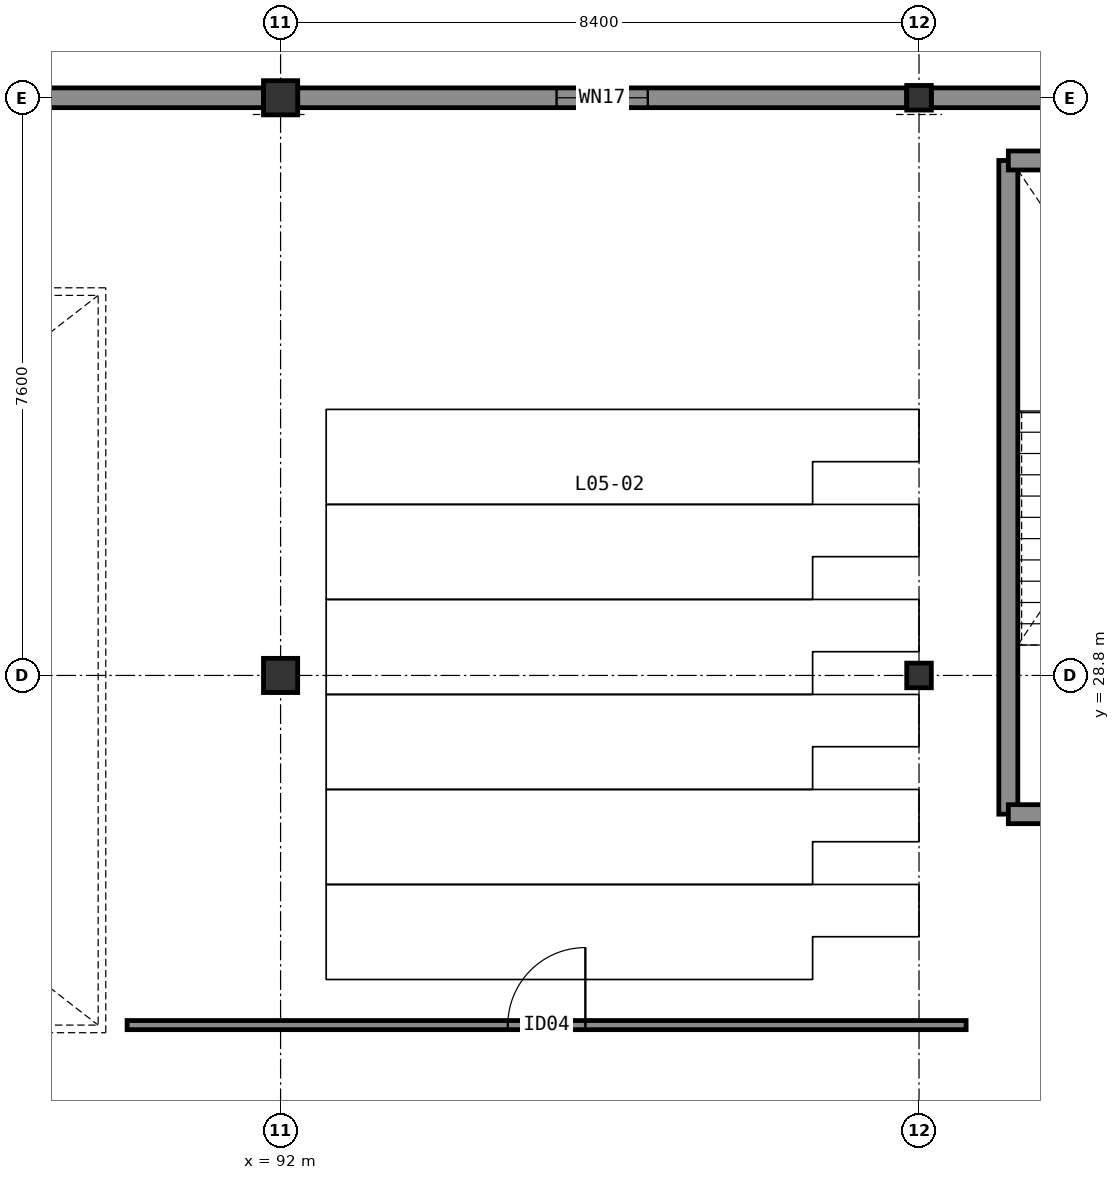
"""IFC4 building model, lengths in metres.
Left out: names, types, materials, properties, quantities, classifications, styles, units other than length and angle.
Written with IfcOpenShell. Run it as: python <this file> out.ifc"""

import sys

from ifc_helpers import new_model, si_unit, direction, frame, frame_2d, origin, origin_2d, place, context, subcontext, project, spatial, rectangle, hollow_circle, extrude, element, fill, save


model = new_model("IFC4")
c1 = context("Model", 3, precision=1e-05, world=origin(), true_north=direction((0.0, 1.0)))
c2 = subcontext(c1, "Body", "Model", "MODEL_VIEW")
j1 = project(units=[si_unit("LENGTHUNIT", "METRE"), si_unit("PLANEANGLEUNIT", "RADIAN")], contexts=[c1])
p1 = place(None, origin())
s1 = spatial("IfcSite", under=j1, at=p1, CompositionType="ELEMENT")
p2 = place(p1, origin())
s2 = spatial("IfcBuilding", under=s1, at=p2, CompositionType="ELEMENT")
p3 = place(p2, frame((0.0, 0.0, 22.2)))
s3 = spatial("IfcBuildingStorey", under=s2, at=p3, CompositionType="ELEMENT", Elevation=22.2)
p4 = place(p3, frame((92.0, 28.8, 0.0), z_axis=(0.0, 0.0, 1.0), x_axis=(1.0, 0.0, 0.0)))
e1 = element("IfcColumn", 1, at=p4, inside=s3, PredefinedType="COLUMN", context=c2, shape_type="SweptSolid", body=[
    extrude(rectangle(XDim=0.45, YDim=0.45, at=origin_2d()), origin(), (0.0, 0.0, 1.0), 4.2),
])
p5 = place(p3, frame((100.4, 28.8, 0.0), z_axis=(0.0, 0.0, 1.0), x_axis=(1.0, 0.0, 0.0)))
e2 = element("IfcColumn", 2, at=p5, inside=s3, PredefinedType="COLUMN", context=c2, shape_type="SweptSolid", body=[
    extrude(hollow_circle(Radius=0.162, WallThickness=0.016, at=origin_2d()), origin(), (0.0, 0.0, 1.0), 4.2),
])
p6 = place(p3, frame((92.0, 36.4, 0.0), z_axis=(0.0, 0.0, 1.0), x_axis=(1.0, 0.0, 0.0)))
e3 = element("IfcColumn", 3, at=p6, inside=s3, PredefinedType="COLUMN", context=c2, shape_type="SweptSolid", body=[
    extrude(rectangle(XDim=0.45, YDim=0.45, at=origin_2d()), origin(), (0.0, 0.0, 1.0), 4.2),
])
p7 = place(p3, frame((100.4, 36.4, 0.0), z_axis=(0.0, 0.0, 1.0), x_axis=(1.0, 0.0, 0.0)))
e4 = element("IfcColumn", 4, at=p7, inside=s3, PredefinedType="COLUMN", context=c2, shape_type="SweptSolid", body=[
    extrude(hollow_circle(Radius=0.162, WallThickness=0.016, at=origin_2d()), origin(), (0.0, 0.0, 1.0), 4.2),
])
p8 = place(p3, frame((108.638, 36.4, 0.0), z_axis=(0.0, 0.0, 1.0), x_axis=(-1.0, 0.0, 0.0)))
e5 = element("IfcWall", 5, at=p8, inside=s3, PredefinedType="SOLIDWALL", context=c2, shape_type="SweptSolid", body=[
    extrude(rectangle(XDim=8.076, YDim=0.26, at=frame_2d((4.038, 0.0))), origin(), (0.0, 0.0, 1.0), 3.627),
])
p9 = place(p8, frame((2.538, 0.0, 0.95)))
e6 = element("IfcOpeningElement", 6, at=p9, cuts=e5, PredefinedType="OPENING", context=c2, shape_type="SweptSolid", body=[
    extrude(rectangle(XDim=3.0, YDim=1.8, at=frame_2d((1.5, 0.9))), frame((0.0, 0.14, 0.0), z_axis=(0.0, -1.0, 0.0), x_axis=(1.0, 0.0, 0.0)), (0.0, 0.0, 1.0), 0.28),
])
p10 = place(p3, frame((100.238, 36.4, 0.0), z_axis=(0.0, 0.0, 1.0), x_axis=(-1.0, 0.0, 0.0)))
e7 = element("IfcWall", 7, at=p10, inside=s3, PredefinedType="SOLIDWALL", context=c2, shape_type="SweptSolid", body=[
    extrude(rectangle(XDim=8.013, YDim=0.26, at=frame_2d((4.006, 0.0))), origin(), (0.0, 0.0, 1.0), 3.627),
])
p11 = place(p10, frame((3.406, 0.0, 0.95)))
e8 = element("IfcOpeningElement", 8, at=p11, cuts=e7, PredefinedType="OPENING", context=c2, shape_type="SweptSolid", body=[
    extrude(rectangle(XDim=1.2, YDim=2.1, at=frame_2d((0.6, 1.05))), frame((0.0, 0.14, 0.0), z_axis=(0.0, -1.0, 0.0), x_axis=(1.0, 0.0, 0.0)), (0.0, 0.0, 1.0), 0.28),
])
p12 = place(p3, frame((91.775, 36.4, 0.0), z_axis=(0.0, 0.0, 1.0), x_axis=(-1.0, 0.0, 0.0)))
e9 = element("IfcWall", 9, at=p12, inside=s3, PredefinedType="SOLIDWALL", context=c2, shape_type="SweptSolid", body=[
    extrude(rectangle(XDim=7.95, YDim=0.26, at=frame_2d((3.975, 0.0))), origin(), (0.0, 0.0, 1.0), 3.627),
])
p13 = place(p12, frame((3.225, 0.0, 0.95)))
e10 = element("IfcOpeningElement", 10, at=p13, cuts=e9, PredefinedType="OPENING", context=c2, shape_type="SweptSolid", body=[
    extrude(rectangle(XDim=1.5, YDim=2.1, at=frame_2d((0.75, 1.05))), frame((0.0, 0.14, 0.0), z_axis=(0.0, -1.0, 0.0), x_axis=(1.0, 0.0, 0.0)), (0.0, 0.0, 1.0), 0.28),
])
p14 = place(p3, frame((101.575, 26.975, 0.0), z_axis=(0.0, 0.0, 1.0), x_axis=(0.0, 1.0, 0.0)))
e11 = element("IfcWall", 11, at=p14, inside=s3, PredefinedType="SHEAR", context=c2, shape_type="SweptSolid", body=[
    extrude(rectangle(XDim=8.6, YDim=0.25, at=frame_2d((4.3, 0.0))), origin(), (0.0, 0.0, 1.0), 3.96),
])
p15 = place(p3, frame((101.575, 35.575, 0.0), z_axis=(0.0, 0.0, 1.0), x_axis=(1.0, 0.0, 0.0)))
e12 = element("IfcWall", 12, at=p15, inside=s3, PredefinedType="SHEAR", context=c2, shape_type="SweptSolid", body=[
    extrude(rectangle(XDim=4.45, YDim=0.25, at=frame_2d((2.225, 0.0))), origin(), (0.0, 0.0, 1.0), 3.96),
])
p16 = place(p3, frame((101.575, 26.975, 0.0), z_axis=(0.0, 0.0, 1.0), x_axis=(1.0, 0.0, 0.0)))
e13 = element("IfcWall", 13, at=p16, inside=s3, PredefinedType="SHEAR", context=c2, shape_type="SweptSolid", body=[
    extrude(rectangle(XDim=4.45, YDim=0.25, at=frame_2d((2.225, 0.0))), origin(), (0.0, 0.0, 1.0), 3.96),
])
p17 = place(p16, frame((1.65, 0.0, 0.0)))
e14 = element("IfcOpeningElement", 14, at=p17, cuts=e13, PredefinedType="OPENING", context=c2, shape_type="SweptSolid", body=[
    extrude(rectangle(XDim=1.1, YDim=2.1, at=frame_2d((0.55, 1.05))), frame((0.0, 0.135, 0.0), z_axis=(0.0, -1.0, 0.0), x_axis=(1.0, 0.0, 0.0)), (0.0, 0.0, 1.0), 0.27),
])
p18 = place(p3, frame((89.98, 24.2, 0.0), z_axis=(0.0, 0.0, 1.0), x_axis=(1.0, 0.0, 0.0)))
e15 = element("IfcWall", 15, at=p18, inside=s3, PredefinedType="PARTITIONING", context=c2, shape_type="SweptSolid", body=[
    extrude(rectangle(XDim=11.039, YDim=0.12, at=frame_2d((5.52, 0.0))), origin(), (0.0, 0.0, 1.0), 3.95),
])
p19 = place(p18, frame((5.01, 0.0, 0.0)))
e16 = element("IfcOpeningElement", 16, at=p19, cuts=e15, PredefinedType="OPENING", context=c2, shape_type="SweptSolid", body=[
    extrude(rectangle(XDim=1.02, YDim=2.12, at=frame_2d((0.51, 1.06))), frame((0.0, 0.07, 0.0), z_axis=(0.0, -1.0, 0.0), x_axis=(1.0, 0.0, 0.0)), (0.0, 0.0, 1.0), 0.14),
])
p20 = place(p11, origin())
e17 = element("IfcWindow", 17, at=p20, inside=s3, PartitioningType="SINGLE_PANEL", PredefinedType="WINDOW", context=c2, shape_type="SweptSolid", body=[
    extrude(rectangle(XDim=1.2, YDim=2.1, at=frame_2d((0.6, 1.05))), frame((0.0, 0.03, 0.0), z_axis=(0.0, -1.0, 0.0), x_axis=(1.0, 0.0, 0.0)), (0.0, 0.0, 1.0), 0.06),
])
fill(e8, e17)
p21 = place(p19, origin())
e18 = element("IfcDoor", 18, at=p21, inside=s3, OperationType="SINGLE_SWING_RIGHT", PredefinedType="DOOR", context=c2, shape_type="SweptSolid", body=[
    extrude(rectangle(XDim=1.02, YDim=2.12, at=frame_2d((0.51, 1.06))), frame((0.0, 0.025, 0.0), z_axis=(0.0, -1.0, 0.0), x_axis=(1.0, 0.0, 0.0)), (0.0, 0.0, 1.0), 0.05),
])
fill(e16, e18)
save(model, sys.argv[1])
